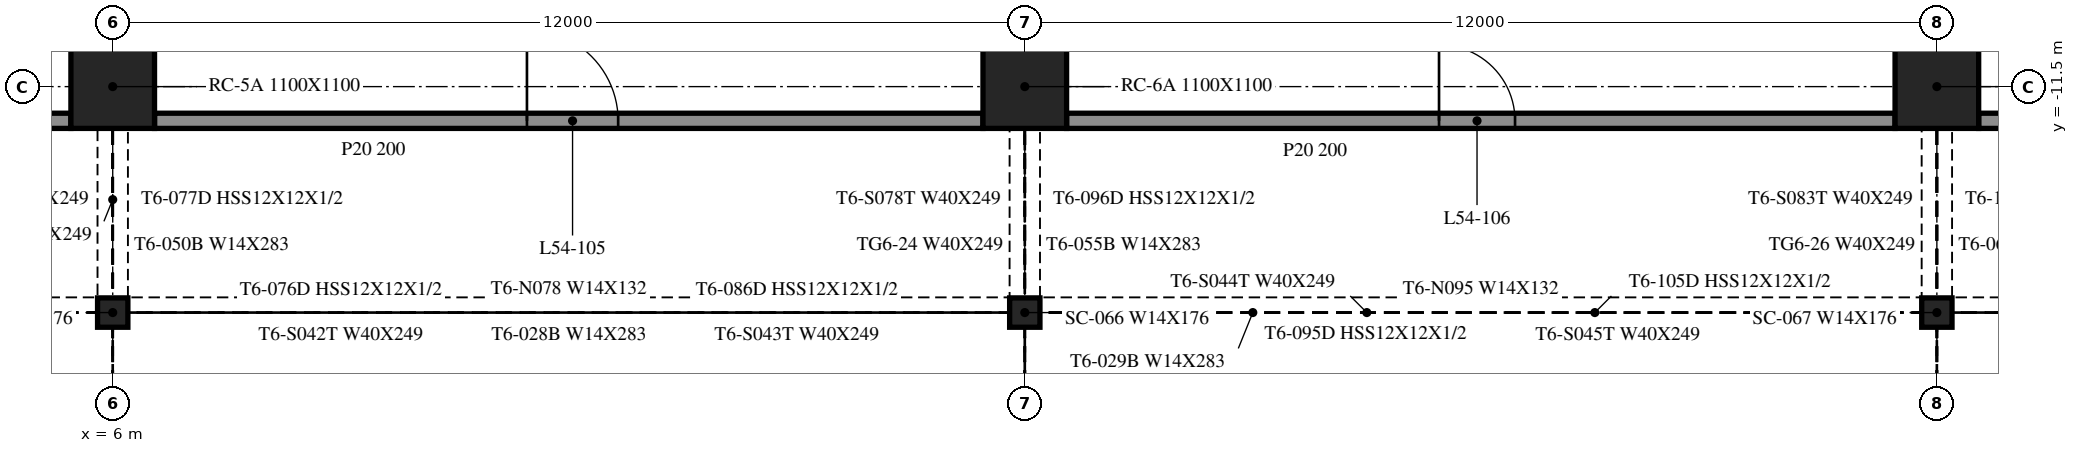
"""IFC4 building model, lengths in metres.
Left out: names, types, materials, properties, quantities, classifications, styles, units other than length and angle.
Written with IfcOpenShell. Run it as: python <this file> out.ifc"""

import sys

from ifc_helpers import new_model, si_unit, direction, frame, frame_2d, origin, origin_2d, place, context, subcontext, project, spatial, rectangle, i_section, extrude, element, fill, save


model = new_model("IFC4")
c1 = context("Model", 3, precision=1e-05, world=origin(), true_north=direction((0.0, 1.0)))
c2 = subcontext(c1, "Body", "Model", "MODEL_VIEW")
j1 = project(units=[si_unit("LENGTHUNIT", "METRE"), si_unit("PLANEANGLEUNIT", "RADIAN")], contexts=[c1])
p1 = place(None, origin())
s1 = spatial("IfcSite", under=j1, at=p1, CompositionType="ELEMENT")
p2 = place(p1, origin())
s2 = spatial("IfcBuilding", under=s1, at=p2, CompositionType="ELEMENT")
p3 = place(p2, frame((0.0, 0.0, 224.3)))
s3 = spatial("IfcBuildingStorey", under=s2, at=p3, CompositionType="ELEMENT", Elevation=224.3)
for number, where, z_axis, x_axis in (
    (1, (6.0, -11.5, -0.4), (0.0, 0.0, 1.0), (1.0, 0.0, 0.0)),
    (2, (18.0, -11.5, -0.4), (0.0, 0.0, 1.0), (1.0, 0.0, 0.0)),
    (3, (30.0, -11.5, -0.4), (0.0, 0.0, 1.0), (1.0, 0.0, 0.0)),
):
    element("IfcColumn", number, at=place(p3, frame(where, z_axis=z_axis, x_axis=x_axis)), inside=s3, PredefinedType="COLUMN", context=c2, shape_type="SweptSolid", body=[
        extrude(rectangle(XDim=1.1, YDim=1.1, at=origin_2d()), origin(), (0.0, 0.0, 1.0), 4.36),
    ])
for number, where, z_axis, x_axis in (
    (4, (6.0, -14.473, -0.4), (0.0, 0.0, 1.0), (1.0, 0.0, 0.0)),
    (5, (18.0, -14.473, -0.4), (0.0, 0.0, 1.0), (1.0, 0.0, 0.0)),
    (6, (30.0, -14.473, -0.4), (0.0, 0.0, 1.0), (1.0, 0.0, 0.0)),
):
    element("IfcColumn", number, at=place(p3, frame(where, z_axis=z_axis, x_axis=x_axis)), inside=s3, PredefinedType="COLUMN", context=c2, shape_type="SweptSolid", body=[
        extrude(i_section(OverallWidth=0.399, OverallDepth=0.386, WebThickness=0.021, FlangeThickness=0.033, at=origin_2d()), origin(), (0.0, 0.0, 1.0), 4.36),
    ])
p4 = place(p3, frame((-5.45, -11.95, 0.0), z_axis=(0.0, 0.0, 1.0), x_axis=(1.0, 0.0, 0.0)))
e7 = element("IfcWall", 7, at=p4, inside=s3, PredefinedType="PARTITIONING", context=c2, shape_type="SweptSolid", body=[
    extrude(rectangle(XDim=10.9, YDim=0.2, at=frame_2d((5.45, 0.0))), origin(), (0.0, 0.0, 1.0), 3.96),
])
p5 = place(p4, frame((4.9, 0.0, 0.0)))
e8 = element("IfcOpeningElement", 8, at=p5, cuts=e7, PredefinedType="OPENING", context=c2, shape_type="SweptSolid", body=[
    extrude(rectangle(XDim=1.0, YDim=2.1, at=frame_2d((0.5, 1.05))), frame((0.0, 0.11, 0.0), z_axis=(0.0, -1.0, 0.0), x_axis=(1.0, 0.0, 0.0)), (0.0, 0.0, 1.0), 0.22),
])
p6 = place(p3, frame((6.55, -11.95, 0.0), z_axis=(0.0, 0.0, 1.0), x_axis=(1.0, 0.0, 0.0)))
e9 = element("IfcWall", 9, at=p6, inside=s3, PredefinedType="PARTITIONING", context=c2, shape_type="SweptSolid", body=[
    extrude(rectangle(XDim=10.9, YDim=0.2, at=frame_2d((5.45, 0.0))), origin(), (0.0, 0.0, 1.0), 3.96),
])
p7 = place(p6, frame((4.9, 0.0, 0.0)))
e10 = element("IfcOpeningElement", 10, at=p7, cuts=e9, PredefinedType="OPENING", context=c2, shape_type="SweptSolid", body=[
    extrude(rectangle(XDim=1.2, YDim=2.1, at=frame_2d((0.6, 1.05))), frame((0.0, 0.11, 0.0), z_axis=(0.0, -1.0, 0.0), x_axis=(1.0, 0.0, 0.0)), (0.0, 0.0, 1.0), 0.22),
])
p8 = place(p3, frame((18.55, -11.95, 0.0), z_axis=(0.0, 0.0, 1.0), x_axis=(1.0, 0.0, 0.0)))
e11 = element("IfcWall", 11, at=p8, inside=s3, PredefinedType="PARTITIONING", context=c2, shape_type="SweptSolid", body=[
    extrude(rectangle(XDim=10.9, YDim=0.2, at=frame_2d((5.45, 0.0))), origin(), (0.0, 0.0, 1.0), 3.96),
])
p9 = place(p8, frame((4.9, 0.0, 0.0)))
e12 = element("IfcOpeningElement", 12, at=p9, cuts=e11, PredefinedType="OPENING", context=c2, shape_type="SweptSolid", body=[
    extrude(rectangle(XDim=1.0, YDim=2.1, at=frame_2d((0.5, 1.05))), frame((0.0, 0.11, 0.0), z_axis=(0.0, -1.0, 0.0), x_axis=(1.0, 0.0, 0.0)), (0.0, 0.0, 1.0), 0.22),
])
p10 = place(p3, frame((30.55, -11.95, 0.0), z_axis=(0.0, 0.0, 1.0), x_axis=(1.0, 0.0, 0.0)))
e13 = element("IfcWall", 13, at=p10, inside=s3, PredefinedType="PARTITIONING", context=c2, shape_type="SweptSolid", body=[
    extrude(rectangle(XDim=10.9, YDim=0.2, at=frame_2d((5.45, 0.0))), origin(), (0.0, 0.0, 1.0), 3.96),
])
p11 = place(p10, frame((4.9, 0.0, 0.0)))
e14 = element("IfcOpeningElement", 14, at=p11, cuts=e13, PredefinedType="OPENING", context=c2, shape_type="SweptSolid", body=[
    extrude(rectangle(XDim=1.2, YDim=2.1, at=frame_2d((0.6, 1.05))), frame((0.0, 0.11, 0.0), z_axis=(0.0, -1.0, 0.0), x_axis=(1.0, 0.0, 0.0)), (0.0, 0.0, 1.0), 0.22),
])
p12 = place(p7, origin())
e15 = element("IfcDoor", 15, at=p12, inside=s3, OperationType="SINGLE_SWING_LEFT", PredefinedType="DOOR", context=c2, shape_type="SweptSolid", body=[
    extrude(rectangle(XDim=1.2, YDim=2.1, at=frame_2d((0.6, 1.05))), frame((0.0, 0.025, 0.0), z_axis=(0.0, -1.0, 0.0), x_axis=(1.0, 0.0, 0.0)), (0.0, 0.0, 1.0), 0.05),
])
fill(e10, e15)
p13 = place(p9, origin())
e16 = element("IfcDoor", 16, at=p13, inside=s3, OperationType="SINGLE_SWING_RIGHT", PredefinedType="DOOR", context=c2, shape_type="SweptSolid", body=[
    extrude(rectangle(XDim=1.0, YDim=2.1, at=frame_2d((0.5, 1.05))), frame((0.0, 0.025, 0.0), z_axis=(0.0, -1.0, 0.0), x_axis=(1.0, 0.0, 0.0)), (0.0, 0.0, 1.0), 0.05),
])
fill(e12, e16)
save(model, sys.argv[1])
